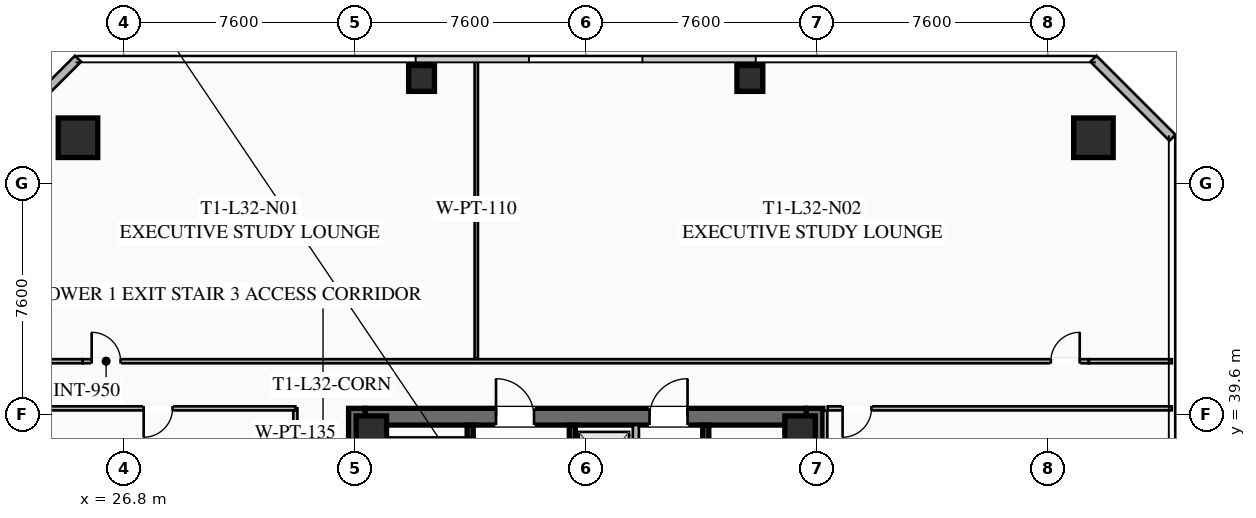
"""IFC4 building model, lengths in metres.
Left out: names, types, materials, properties, quantities, classifications, styles, units other than length and angle.
Written with IfcOpenShell. Run it as: python <this file> out.ifc"""

import sys

from ifc_helpers import new_model, si_unit, direction, frame, frame_2d, origin, origin_2d, place, context, subcontext, project, spatial, rectangle, hollow_rectangle, extrude, element, fill, save


model = new_model("IFC4")
c1 = context("Model", 3, precision=1e-05, world=origin(), true_north=direction((0.0, 1.0)))
c2 = subcontext(c1, "Body", "Model", "MODEL_VIEW")
j1 = project(units=[si_unit("LENGTHUNIT", "METRE"), si_unit("PLANEANGLEUNIT", "RADIAN")], contexts=[c1])
p1 = place(None, origin())
s1 = spatial("IfcSite", under=j1, at=p1, CompositionType="ELEMENT")
p2 = place(p1, origin())
s2 = spatial("IfcBuilding", under=s1, at=p2, CompositionType="ELEMENT")
p3 = place(p2, frame((0.0, 0.0, 121.5)))
s3 = spatial("IfcBuildingStorey", under=s2, at=p3, CompositionType="ELEMENT", Elevation=121.5)
for number, where, z_axis, x_axis in (
    (1, (34.475, 24.2, 0.0), (0.0, 0.0, 1.0), (0.0, 1.0, 0.0)),
    (2, (49.525, 39.8, 0.0), (0.0, 0.0, 1.0), (0.0, -1.0, 0.0)),
):
    element("IfcWall", number, at=place(p3, frame(where, z_axis=z_axis, x_axis=x_axis)), inside=s3, PredefinedType="SHEAR", context=c2, shape_type="SweptSolid", body=[
        extrude(rectangle(XDim=15.6, YDim=0.55, at=frame_2d((7.8, 0.0))), origin(), (0.0, 0.0, 1.0), 3.55),
    ])
p4 = place(p3, frame((34.75, 39.525, 0.0), z_axis=(0.0, 0.0, 1.0), x_axis=(1.0, 0.0, 0.0)))
e3 = element("IfcWall", 3, at=p4, inside=s3, PredefinedType="SHEAR", context=c2, shape_type="SweptSolid", body=[
    extrude(rectangle(XDim=14.5, YDim=0.55, at=frame_2d((7.25, 0.0))), origin(), (0.0, 0.0, 1.0), 3.55),
])
p5 = place(p4, frame((4.3, 0.0, 0.0)))
e4 = element("IfcOpeningElement", 4, at=p5, cuts=e3, PredefinedType="OPENING", context=c2, shape_type="SweptSolid", body=[
    extrude(rectangle(XDim=1.25, YDim=2.25, at=frame_2d((0.625, 1.125))), frame((0.0, 0.285, 0.0), z_axis=(0.0, -1.0, 0.0), x_axis=(1.0, 0.0, 0.0)), (0.0, 0.0, 1.0), 0.57),
])
p6 = place(p4, frame((9.35, 0.0, 0.0)))
e5 = element("IfcOpeningElement", 5, at=p6, cuts=e3, PredefinedType="OPENING", context=c2, shape_type="SweptSolid", body=[
    extrude(rectangle(XDim=1.25, YDim=2.25, at=frame_2d((0.625, 1.125))), frame((0.0, 0.285, 0.0), z_axis=(0.0, -1.0, 0.0), x_axis=(1.0, 0.0, 0.0)), (0.0, 0.0, 1.0), 0.57),
])
for number, where, z_axis, x_axis in (
    (6, (49.05, 39.05, 0.0), (0.0, 0.0, 1.0), (1.0, 0.0, 0.0)),
    (7, (34.95, 39.05, 0.0), (0.0, 0.0, 1.0), (1.0, 0.0, 0.0)),
):
    element("IfcColumn", number, at=place(p3, frame(where, z_axis=z_axis, x_axis=x_axis)), inside=s3, PredefinedType="COLUMN", context=c2, shape_type="SweptSolid", body=[
        extrude(hollow_rectangle(XDim=1.0, YDim=1.0, WallThickness=0.04, at=origin_2d()), origin(), (0.0, 0.0, 1.0), 3.37),
    ])
for number, where, z_axis, x_axis in (
    (8, (58.7, 48.7, 0.0), (0.0, 0.0, 1.0), (1.0, 0.0, 0.0)),
    (9, (25.3, 48.7, 0.0), (0.0, 0.0, 1.0), (1.0, 0.0, 0.0)),
):
    element("IfcColumn", number, at=place(p3, frame(where, z_axis=z_axis, x_axis=x_axis)), inside=s3, PredefinedType="COLUMN", context=c2, shape_type="SweptSolid", body=[
        extrude(hollow_rectangle(XDim=1.3, YDim=1.3, WallThickness=0.05, at=origin_2d()), origin(), (0.0, 0.0, 1.0), 3.37),
    ])
for number, where, z_axis, x_axis in (
    (10, (47.4, 50.65, 0.0), (0.0, 0.0, 1.0), (1.0, 0.0, 0.0)),
    (11, (36.6, 50.65, 0.0), (0.0, 0.0, 1.0), (1.0, 0.0, 0.0)),
):
    element("IfcColumn", number, at=place(p3, frame(where, z_axis=z_axis, x_axis=x_axis)), inside=s3, PredefinedType="COLUMN", context=c2, shape_type="SweptSolid", body=[
        extrude(hollow_rectangle(XDim=0.85, YDim=0.85, WallThickness=0.035, at=origin_2d()), origin(), (0.0, 0.0, 1.0), 3.37),
    ])
for number, where, z_axis, x_axis in (
    (12, (22.7, 48.7, 0.0), (0.0, 0.0, 1.0), (0.707, 0.707, 0.0)),
    (13, (58.7, 51.3, 0.0), (0.0, 0.0, 1.0), (0.707, -0.707, 0.0)),
):
    element("IfcWall", number, at=place(p3, frame(where, z_axis=z_axis, x_axis=x_axis)), inside=s3, PredefinedType="SOLIDWALL", context=c2, shape_type="SweptSolid", body=[
        extrude(rectangle(XDim=3.677, YDim=0.28, at=frame_2d((1.838, 0.0))), origin(), (0.0, 0.0, 1.0), 3.37),
    ])
p7 = place(p3, frame((38.2, 31.2, 0.0), z_axis=(0.0, 0.0, 1.0), x_axis=(0.0, 1.0, 0.0)))
e14 = element("IfcWall", 14, at=p7, inside=s3, PredefinedType="SHEAR", context=c2, shape_type="SweptSolid", body=[
    extrude(rectangle(XDim=8.05, YDim=0.2, at=frame_2d((4.025, 0.0))), origin(), (0.0, 0.0, 1.0), 3.37),
])
p8 = place(p7, frame((0.45, 0.0, 0.0)))
e15 = element("IfcOpeningElement", 15, at=p8, cuts=e14, PredefinedType="OPENING", context=c2, shape_type="SweptSolid", body=[
    extrude(rectangle(XDim=1.15, YDim=2.2, at=frame_2d((0.575, 1.1))), frame((0.0, 0.11, 0.0), z_axis=(0.0, -1.0, 0.0), x_axis=(1.0, 0.0, 0.0)), (0.0, 0.0, 1.0), 0.22),
])
p9 = place(p3, frame((41.56, 24.75, 0.0), z_axis=(0.0, 0.0, 1.0), x_axis=(0.0, 1.0, 0.0)))
e16 = element("IfcWall", 16, at=p9, inside=s3, PredefinedType="SHEAR", context=c2, shape_type="SweptSolid", body=[
    extrude(rectangle(XDim=14.5, YDim=0.2, at=frame_2d((7.25, 0.0))), origin(), (0.0, 0.0, 1.0), 3.37),
])
p10 = place(p3, frame((45.95, 39.25, 0.0), z_axis=(0.0, 0.0, 1.0), x_axis=(0.0, -1.0, 0.0)))
e17 = element("IfcWall", 17, at=p10, inside=s3, PredefinedType="SHEAR", context=c2, shape_type="SweptSolid", body=[
    extrude(rectangle(XDim=6.45, YDim=0.2, at=frame_2d((3.225, 0.0))), origin(), (0.0, 0.0, 1.0), 3.37),
])
p11 = place(p3, frame((43.65, 32.35, 0.0), z_axis=(0.0, 0.0, 1.0), x_axis=(0.0, 1.0, 0.0)))
e18 = element("IfcWall", 18, at=p11, inside=s3, PredefinedType="SOLIDWALL", context=c2, shape_type="SweptSolid", body=[
    extrude(rectangle(XDim=6.9, YDim=0.2, at=frame_2d((3.45, 0.0))), origin(), (0.0, 0.0, 1.0), 3.37),
])
p12 = place(p11, frame((0.575, 0.0, 0.0)))
e19 = element("IfcOpeningElement", 19, at=p12, cuts=e18, PredefinedType="OPENING", context=c2, shape_type="SweptSolid", body=[
    extrude(rectangle(XDim=1.1, YDim=2.2, at=frame_2d((0.55, 1.1))), frame((0.0, 0.11, 0.0), z_axis=(0.0, -1.0, 0.0), x_axis=(1.0, 0.0, 0.0)), (0.0, 0.0, 1.0), 0.22),
])
p13 = place(p11, frame((2.825, 0.0, 0.0)))
e20 = element("IfcOpeningElement", 20, at=p13, cuts=e18, PredefinedType="OPENING", context=c2, shape_type="SweptSolid", body=[
    extrude(rectangle(XDim=1.1, YDim=2.2, at=frame_2d((0.55, 1.1))), frame((0.0, 0.11, 0.0), z_axis=(0.0, -1.0, 0.0), x_axis=(1.0, 0.0, 0.0)), (0.0, 0.0, 1.0), 0.22),
])
p14 = place(p11, frame((5.075, 0.0, 0.0)))
e21 = element("IfcOpeningElement", 21, at=p14, cuts=e18, PredefinedType="OPENING", context=c2, shape_type="SweptSolid", body=[
    extrude(rectangle(XDim=1.1, YDim=2.2, at=frame_2d((0.55, 1.1))), frame((0.0, 0.11, 0.0), z_axis=(0.0, -1.0, 0.0), x_axis=(1.0, 0.0, 0.0)), (0.0, 0.0, 1.0), 0.22),
])
p15 = place(p3, frame((32.45, 35.4, 0.0), z_axis=(0.0, 0.0, 1.0), x_axis=(0.0, 1.0, 0.0)))
e22 = element("IfcWall", 22, at=p15, inside=s3, PredefinedType="PARTITIONING", context=c2, shape_type="SweptSolid", body=[
    extrude(rectangle(XDim=4.4, YDim=0.135, at=frame_2d((2.2, 0.0))), origin(), (0.0, 0.0, 1.0), 2.723),
])
p16 = place(p3, frame((25.45, 41.35, 0.0), z_axis=(0.0, 0.0, 1.0), x_axis=(1.0, 0.0, 0.0)))
e23 = element("IfcWall", 23, at=p16, inside=s3, PredefinedType="PARTITIONING", context=c2, shape_type="SweptSolid", body=[
    extrude(rectangle(XDim=33.1, YDim=0.135, at=frame_2d((16.55, 0.0))), origin(), (0.0, 0.0, 1.0), 2.723),
])
p17 = place(p16, frame((0.3, 0.0, 0.0)))
e24 = element("IfcOpeningElement", 24, at=p17, cuts=e23, PredefinedType="OPENING", context=c2, shape_type="SweptSolid", body=[
    extrude(rectangle(XDim=0.95, YDim=2.05, at=frame_2d((0.475, 1.025))), frame((0.0, 0.077, 0.0), z_axis=(0.0, -1.0, 0.0), x_axis=(1.0, 0.0, 0.0)), (0.0, 0.0, 1.0), 0.155),
])
p18 = place(p16, frame((31.85, 0.0, 0.0)))
e25 = element("IfcOpeningElement", 25, at=p18, cuts=e23, PredefinedType="OPENING", context=c2, shape_type="SweptSolid", body=[
    extrude(rectangle(XDim=0.95, YDim=2.05, at=frame_2d((0.475, 1.025))), frame((0.0, 0.077, 0.0), z_axis=(0.0, -1.0, 0.0), x_axis=(1.0, 0.0, 0.0)), (0.0, 0.0, 1.0), 0.155),
])
for number, where, z_axis, x_axis in (
    (26, (22.72, 41.35, 0.0), (0.0, 0.0, 1.0), (1.0, 0.0, 0.0)),
    (27, (58.55, 41.35, 0.0), (0.0, 0.0, 1.0), (1.0, 0.0, 0.0)),
):
    element("IfcWall", number, at=place(p3, frame(where, z_axis=z_axis, x_axis=x_axis)), inside=s3, PredefinedType="PARTITIONING", context=c2, shape_type="SweptSolid", body=[
        extrude(rectangle(XDim=2.73, YDim=0.135, at=frame_2d((1.365, 0.0))), origin(), (0.0, 0.0, 1.0), 2.723),
    ])
p19 = place(p3, frame((38.4, 41.43, 0.0), z_axis=(0.0, 0.0, 1.0), x_axis=(0.0, 1.0, 0.0)))
e28 = element("IfcWall", 28, at=p19, inside=s3, PredefinedType="PARTITIONING", context=c2, shape_type="SweptSolid", body=[
    extrude(rectangle(XDim=9.85, YDim=0.11, at=frame_2d((4.925, 0.0))), origin(), (0.0, 0.0, 1.0), 2.723),
])
p20 = place(p3, frame((49.88, 39.72, 0.0), z_axis=(0.0, 0.0, 1.0), x_axis=(0.0, -1.0, 0.0)))
e29 = element("IfcWall", 29, at=p20, inside=s3, PredefinedType="PARTITIONING", context=c2, shape_type="SweptSolid", body=[
    extrude(rectangle(XDim=15.44, YDim=0.135, at=frame_2d((7.72, 0.0))), origin(), (0.0, 0.0, 1.0), 2.723),
])
p21 = place(p3, frame((61.28, 39.8, 0.0), z_axis=(0.0, 0.0, 1.0), x_axis=(-1.0, 0.0, 0.0)))
e30 = element("IfcWall", 30, at=p21, inside=s3, PredefinedType="PARTITIONING", context=c2, shape_type="SweptSolid", body=[
    extrude(rectangle(XDim=11.32, YDim=0.135, at=frame_2d((5.66, 0.0))), origin(), (0.0, 0.0, 1.0), 2.723),
])
p22 = place(p21, frame((9.88, 0.0, 0.0)))
e31 = element("IfcOpeningElement", 31, at=p22, cuts=e30, PredefinedType="OPENING", context=c2, shape_type="SweptSolid", body=[
    extrude(rectangle(XDim=0.95, YDim=2.05, at=frame_2d((0.475, 1.025))), frame((0.0, 0.077, 0.0), z_axis=(0.0, -1.0, 0.0), x_axis=(1.0, 0.0, 0.0)), (0.0, 0.0, 1.0), 0.155),
])
p23 = place(p3, frame((32.45, 39.8, 0.0), z_axis=(0.0, 0.0, 1.0), x_axis=(-1.0, 0.0, 0.0)))
e32 = element("IfcWall", 32, at=p23, inside=s3, PredefinedType="PARTITIONING", context=c2, shape_type="SweptSolid", body=[
    extrude(rectangle(XDim=9.73, YDim=0.135, at=frame_2d((4.865, 0.0))), origin(), (0.0, 0.0, 1.0), 2.723),
])
p24 = place(p23, frame((4.04, 0.0, 0.0)))
e33 = element("IfcOpeningElement", 33, at=p24, cuts=e32, PredefinedType="OPENING", context=c2, shape_type="SweptSolid", body=[
    extrude(rectangle(XDim=0.95, YDim=2.05, at=frame_2d((0.475, 1.025))), frame((0.0, 0.077, 0.0), z_axis=(0.0, -1.0, 0.0), x_axis=(1.0, 0.0, 0.0)), (0.0, 0.0, 1.0), 0.155),
])
p25 = place(p5, origin())
e34 = element("IfcDoor", 34, at=p25, inside=s3, OperationType="SINGLE_SWING_LEFT", PredefinedType="DOOR", context=c2, shape_type="SweptSolid", body=[
    extrude(rectangle(XDim=1.25, YDim=2.25, at=frame_2d((0.625, 1.125))), frame((0.0, 0.025, 0.0), z_axis=(0.0, -1.0, 0.0), x_axis=(1.0, 0.0, 0.0)), (0.0, 0.0, 1.0), 0.05),
])
fill(e4, e34)
p26 = place(p6, origin())
e35 = element("IfcDoor", 35, at=p26, inside=s3, OperationType="SINGLE_SWING_RIGHT", PredefinedType="DOOR", context=c2, shape_type="SweptSolid", body=[
    extrude(rectangle(XDim=1.25, YDim=2.25, at=frame_2d((0.625, 1.125))), frame((0.0, 0.025, 0.0), z_axis=(0.0, -1.0, 0.0), x_axis=(1.0, 0.0, 0.0)), (0.0, 0.0, 1.0), 0.05),
])
fill(e5, e35)
p27 = place(p17, origin())
e36 = element("IfcDoor", 36, at=p27, inside=s3, OperationType="SINGLE_SWING_LEFT", PredefinedType="DOOR", context=c2, shape_type="SweptSolid", body=[
    extrude(rectangle(XDim=0.95, YDim=2.05, at=frame_2d((0.475, 1.025))), frame((0.0, 0.025, 0.0), z_axis=(0.0, -1.0, 0.0), x_axis=(1.0, 0.0, 0.0)), (0.0, 0.0, 1.0), 0.05),
])
fill(e24, e36)
p28 = place(p18, origin())
e37 = element("IfcDoor", 37, at=p28, inside=s3, OperationType="SINGLE_SWING_RIGHT", PredefinedType="DOOR", context=c2, shape_type="SweptSolid", body=[
    extrude(rectangle(XDim=0.95, YDim=2.05, at=frame_2d((0.475, 1.025))), frame((0.0, 0.025, 0.0), z_axis=(0.0, -1.0, 0.0), x_axis=(1.0, 0.0, 0.0)), (0.0, 0.0, 1.0), 0.05),
])
fill(e25, e37)
p29 = place(p22, origin())
e38 = element("IfcDoor", 38, at=p29, inside=s3, OperationType="SINGLE_SWING_RIGHT", PredefinedType="DOOR", context=c2, shape_type="SweptSolid", body=[
    extrude(rectangle(XDim=0.95, YDim=2.05, at=frame_2d((0.475, 1.025))), frame((0.0, 0.025, 0.0), z_axis=(0.0, -1.0, 0.0), x_axis=(1.0, 0.0, 0.0)), (0.0, 0.0, 1.0), 0.05),
])
fill(e31, e38)
p30 = place(p24, origin())
e39 = element("IfcDoor", 39, at=p30, inside=s3, OperationType="SINGLE_SWING_RIGHT", PredefinedType="DOOR", context=c2, shape_type="SweptSolid", body=[
    extrude(rectangle(XDim=0.95, YDim=2.05, at=frame_2d((0.475, 1.025))), frame((0.0, 0.025, 0.0), z_axis=(0.0, -1.0, 0.0), x_axis=(1.0, 0.0, 0.0)), (0.0, 0.0, 1.0), 0.05),
])
fill(e33, e39)
save(model, sys.argv[1])
